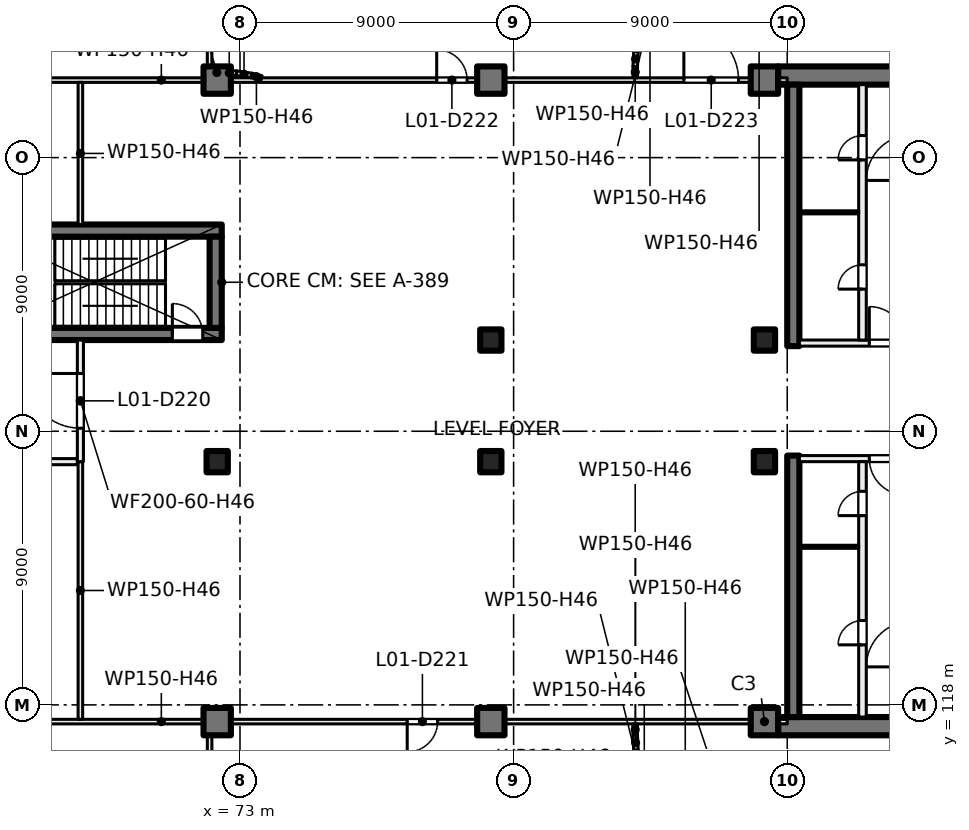
"""IFC4 building model, lengths in metres.
Left out: names, types, materials, properties, quantities, classifications, styles, units other than length and angle.
Written with IfcOpenShell. Run it as: python <this file> out.ifc"""

import sys

from ifc_helpers import new_model, si_unit, direction, frame, frame_2d, origin, origin_2d, place, context, subcontext, project, spatial, rectangle, extrude, element, fill, save


model = new_model("IFC4")
c1 = context("Model", 3, precision=1e-05, world=origin(), true_north=direction((0.0, 1.0)))
c2 = subcontext(c1, "Body", "Model", "MODEL_VIEW")
j1 = project(units=[si_unit("LENGTHUNIT", "METRE"), si_unit("PLANEANGLEUNIT", "RADIAN")], contexts=[c1])
p1 = place(None, origin())
s1 = spatial("IfcSite", under=j1, at=p1, CompositionType="ELEMENT")
p2 = place(p1, origin())
s2 = spatial("IfcBuilding", under=s1, at=p2, CompositionType="ELEMENT")
p3 = place(p2, frame((0.0, 0.0, 7.5)))
s3 = spatial("IfcBuildingStorey", under=s2, at=p3, CompositionType="ELEMENT", Elevation=7.5)
for number, where, z_axis, x_axis in (
    (1, (81.25, 130.0, 0.0), (0.0, 0.0, 1.0), (1.0, 0.0, 0.0)),
    (2, (90.25, 130.0, 0.0), (0.0, 0.0, 1.0), (1.0, 0.0, 0.0)),
    (3, (72.25, 126.0, 0.0), (0.0, 0.0, 1.0), (1.0, 0.0, 0.0)),
    (4, (81.25, 126.0, 0.0), (0.0, 0.0, 1.0), (1.0, 0.0, 0.0)),
    (5, (90.25, 126.0, 0.0), (0.0, 0.0, 1.0), (1.0, 0.0, 0.0)),
):
    element("IfcColumn", number, at=place(p3, frame(where, z_axis=z_axis, x_axis=x_axis)), inside=s3, PredefinedType="COLUMN", context=c2, shape_type="SweptSolid", body=[
        extrude(rectangle(XDim=0.7, YDim=0.7, at=origin_2d()), origin(), (0.0, 0.0, 1.0), 5.0),
    ])
for number, where, z_axis, x_axis in (
    (6, (72.25, 138.55, 0.0), (0.0, 0.0, 1.0), (1.0, 0.0, 0.0)),
    (7, (81.25, 138.55, 0.0), (0.0, 0.0, 1.0), (1.0, 0.0, 0.0)),
    (8, (90.25, 138.55, 0.0), (0.0, 0.0, 1.0), (1.0, 0.0, 0.0)),
    (9, (72.25, 117.45, 0.0), (0.0, 0.0, 1.0), (1.0, 0.0, 0.0)),
    (10, (81.25, 117.45, 0.0), (0.0, 0.0, 1.0), (1.0, 0.0, 0.0)),
    (11, (90.25, 117.45, 0.0), (0.0, 0.0, 1.0), (1.0, 0.0, 0.0)),
):
    element("IfcColumn", number, at=place(p3, frame(where, z_axis=z_axis, x_axis=x_axis)), inside=s3, PredefinedType="COLUMN", context=c2, shape_type="SweptSolid", body=[
        extrude(rectangle(XDim=0.9, YDim=0.9, at=origin_2d()), origin(), (0.0, 0.0, 1.0), 5.0),
    ])
for number, where, z_axis, x_axis in (
    (12, (99.6, 138.7, 0.0), (0.0, 0.0, 1.0), (-1.0, 0.0, 0.0)),
    (13, (99.6, 117.3, 0.0), (0.0, 0.0, 1.0), (-1.0, 0.0, 0.0)),
):
    element("IfcWall", number, at=place(p3, frame(where, z_axis=z_axis, x_axis=x_axis)), inside=s3, PredefinedType="SHEAR", context=c2, shape_type="SweptSolid", body=[
        extrude(rectangle(XDim=8.9, YDim=0.6, at=frame_2d((4.45, 0.0))), origin(), (0.0, 0.0, 1.0), 5.0),
    ])
for number, where, z_axis, x_axis in (
    (14, (91.2, 138.4, 0.0), (0.0, 0.0, 1.0), (0.0, -1.0, 0.0)),
    (15, (91.2, 126.2, 0.0), (0.0, 0.0, 1.0), (0.0, -1.0, 0.0)),
):
    element("IfcWall", number, at=place(p3, frame(where, z_axis=z_axis, x_axis=x_axis)), inside=s3, PredefinedType="SHEAR", context=c2, shape_type="SweptSolid", body=[
        extrude(rectangle(XDim=8.6, YDim=0.4, at=frame_2d((4.3, 0.0))), origin(), (0.0, 0.0, 1.0), 5.0),
    ])
p4 = place(p3, frame((63.6, 130.2, 0.0), z_axis=(0.0, 0.0, 1.0), x_axis=(1.0, 0.0, 0.0)))
e16 = element("IfcWall", 16, at=p4, inside=s3, PredefinedType="SHEAR", context=c2, shape_type="SweptSolid", body=[
    extrude(rectangle(XDim=8.8, YDim=0.4, at=frame_2d((4.4, 0.0))), origin(), (0.0, 0.0, 1.0), 5.0),
])
p5 = place(p4, frame((7.175, 0.0, 0.0)))
e17 = element("IfcOpeningElement", 17, at=p5, cuts=e16, PredefinedType="OPENING", context=c2, shape_type="SweptSolid", body=[
    extrude(rectangle(XDim=1.0, YDim=2.1, at=frame_2d((0.5, 1.05))), frame((0.0, 0.21, 0.0), z_axis=(0.0, -1.0, 0.0), x_axis=(1.0, 0.0, 0.0)), (0.0, 0.0, 1.0), 0.42),
])
p6 = place(p3, frame((64.0, 133.6, 0.0), z_axis=(0.0, 0.0, 1.0), x_axis=(1.0, 0.0, 0.0)))
e18 = element("IfcWall", 18, at=p6, inside=s3, PredefinedType="SHEAR", context=c2, shape_type="SweptSolid", body=[
    extrude(rectangle(XDim=8.4, YDim=0.4, at=frame_2d((4.2, 0.0))), origin(), (0.0, 0.0, 1.0), 5.0),
])
p7 = place(p3, frame((72.2, 130.4, 0.0), z_axis=(0.0, 0.0, 1.0), x_axis=(0.0, 1.0, 0.0)))
e19 = element("IfcWall", 19, at=p7, inside=s3, PredefinedType="SHEAR", context=c2, shape_type="SweptSolid", body=[
    extrude(rectangle(XDim=3.0, YDim=0.4, at=frame_2d((1.5, 0.0))), origin(), (0.0, 0.0, 1.0), 5.0),
])
p8 = place(p3, frame((95.2, 126.1, 0.0), z_axis=(0.0, 0.0, 1.0), x_axis=(-1.0, 0.0, 0.0)))
e20 = element("IfcWall", 20, at=p8, inside=s3, PredefinedType="PARTITIONING", context=c2, shape_type="SweptSolid", body=[
    extrude(rectangle(XDim=3.8, YDim=0.2, at=frame_2d((1.9, 0.0))), origin(), (0.0, 0.0, 1.0), 4.6),
])
p9 = place(p8, frame((0.3, 0.0, 0.0)))
e21 = element("IfcOpeningElement", 21, at=p9, cuts=e20, PredefinedType="OPENING", context=c2, shape_type="SweptSolid", body=[
    extrude(rectangle(XDim=1.2, YDim=2.1, at=frame_2d((0.6, 1.05))), frame((0.0, 0.11, 0.0), z_axis=(0.0, -1.0, 0.0), x_axis=(1.0, 0.0, 0.0)), (0.0, 0.0, 1.0), 0.22),
])
p10 = place(p3, frame((93.475, 117.6, 0.0), z_axis=(0.0, 0.0, 1.0), x_axis=(0.0, 1.0, 0.0)))
e22 = element("IfcWall", 22, at=p10, inside=s3, PredefinedType="PARTITIONING", context=c2, shape_type="SweptSolid", body=[
    extrude(rectangle(XDim=8.4, YDim=0.25, at=frame_2d((4.2, 0.0))), origin(), (0.0, 0.0, 1.0), 4.6),
])
p11 = place(p10, frame((6.625, 0.0, 0.0)))
e23 = element("IfcOpeningElement", 23, at=p11, cuts=e22, PredefinedType="OPENING", context=c2, shape_type="SweptSolid", body=[
    extrude(rectangle(XDim=0.8, YDim=2.1, at=frame_2d((0.4, 1.05))), frame((0.0, 0.135, 0.0), z_axis=(0.0, -1.0, 0.0), x_axis=(1.0, 0.0, 0.0)), (0.0, 0.0, 1.0), 0.27),
])
p12 = place(p10, frame((2.375, 0.0, 0.0)))
e24 = element("IfcOpeningElement", 24, at=p12, cuts=e22, PredefinedType="OPENING", context=c2, shape_type="SweptSolid", body=[
    extrude(rectangle(XDim=0.8, YDim=2.1, at=frame_2d((0.4, 1.05))), frame((0.0, 0.135, 0.0), z_axis=(0.0, -1.0, 0.0), x_axis=(1.0, 0.0, 0.0)), (0.0, 0.0, 1.0), 0.27),
])
p13 = place(p3, frame((93.35, 123.2, 0.0), z_axis=(0.0, 0.0, 1.0), x_axis=(-1.0, 0.0, 0.0)))
e25 = element("IfcWall", 25, at=p13, inside=s3, PredefinedType="PARTITIONING", context=c2, shape_type="SweptSolid", body=[
    extrude(rectangle(XDim=1.95, YDim=0.1, at=frame_2d((0.975, 0.0))), origin(), (0.0, 0.0, 1.0), 4.6),
])
p14 = place(p3, frame((91.4, 129.9, 0.0), z_axis=(0.0, 0.0, 1.0), x_axis=(1.0, 0.0, 0.0)))
e26 = element("IfcWall", 26, at=p14, inside=s3, PredefinedType="PARTITIONING", context=c2, shape_type="SweptSolid", body=[
    extrude(rectangle(XDim=3.8, YDim=0.2, at=frame_2d((1.9, 0.0))), origin(), (0.0, 0.0, 1.0), 4.6),
])
p15 = place(p14, frame((2.3, 0.0, 0.0)))
e27 = element("IfcOpeningElement", 27, at=p15, cuts=e26, PredefinedType="OPENING", context=c2, shape_type="SweptSolid", body=[
    extrude(rectangle(XDim=1.2, YDim=2.1, at=frame_2d((0.6, 1.05))), frame((0.0, 0.11, 0.0), z_axis=(0.0, -1.0, 0.0), x_axis=(1.0, 0.0, 0.0)), (0.0, 0.0, 1.0), 0.22),
])
p16 = place(p3, frame((93.475, 130.0, 0.0), z_axis=(0.0, 0.0, 1.0), x_axis=(0.0, 1.0, 0.0)))
e28 = element("IfcWall", 28, at=p16, inside=s3, PredefinedType="PARTITIONING", context=c2, shape_type="SweptSolid", body=[
    extrude(rectangle(XDim=8.4, YDim=0.25, at=frame_2d((4.2, 0.0))), origin(), (0.0, 0.0, 1.0), 4.6),
])
p17 = place(p16, frame((1.675, 0.0, 0.0)))
e29 = element("IfcOpeningElement", 29, at=p17, cuts=e28, PredefinedType="OPENING", context=c2, shape_type="SweptSolid", body=[
    extrude(rectangle(XDim=0.8, YDim=2.1, at=frame_2d((0.4, 1.05))), frame((0.0, 0.135, 0.0), z_axis=(0.0, -1.0, 0.0), x_axis=(1.0, 0.0, 0.0)), (0.0, 0.0, 1.0), 0.27),
])
p18 = place(p16, frame((5.925, 0.0, 0.0)))
e30 = element("IfcOpeningElement", 30, at=p18, cuts=e28, PredefinedType="OPENING", context=c2, shape_type="SweptSolid", body=[
    extrude(rectangle(XDim=0.8, YDim=2.1, at=frame_2d((0.4, 1.05))), frame((0.0, 0.135, 0.0), z_axis=(0.0, -1.0, 0.0), x_axis=(1.0, 0.0, 0.0)), (0.0, 0.0, 1.0), 0.27),
])
p19 = place(p3, frame((91.4, 134.2, 0.0), z_axis=(0.0, 0.0, 1.0), x_axis=(1.0, 0.0, 0.0)))
e31 = element("IfcWall", 31, at=p19, inside=s3, PredefinedType="PARTITIONING", context=c2, shape_type="SweptSolid", body=[
    extrude(rectangle(XDim=1.95, YDim=0.1, at=frame_2d((0.975, 0.0))), origin(), (0.0, 0.0, 1.0), 4.6),
])
p20 = place(p3, frame((91.0, 117.45, 0.0), z_axis=(0.0, 0.0, 1.0), x_axis=(-1.0, 0.0, 0.0)))
e32 = element("IfcWall", 32, at=p20, inside=s3, PredefinedType="PARTITIONING", context=c2, shape_type="SweptSolid", body=[
    extrude(rectangle(XDim=41.175, YDim=0.15, at=frame_2d((20.587, 0.0))), origin(), (0.0, 0.0, 1.0), 4.6),
])
p21 = place(p20, frame((11.5, 0.0, 0.0)))
e33 = element("IfcOpeningElement", 33, at=p21, cuts=e32, PredefinedType="OPENING", context=c2, shape_type="SweptSolid", body=[
    extrude(rectangle(XDim=1.0, YDim=2.1, at=frame_2d((0.5, 1.05))), frame((0.0, 0.085, 0.0), z_axis=(0.0, -1.0, 0.0), x_axis=(1.0, 0.0, 0.0)), (0.0, 0.0, 1.0), 0.17),
])
p22 = place(p3, frame((67.65, 126.0, 0.0), z_axis=(0.0, 0.0, 1.0), x_axis=(-1.0, 0.0, 0.0)))
e34 = element("IfcWall", 34, at=p22, inside=s3, PredefinedType="PARTITIONING", context=c2, shape_type="SweptSolid", body=[
    extrude(rectangle(XDim=17.8, YDim=0.2, at=frame_2d((8.9, 0.0))), origin(), (0.0, 0.0, 1.0), 4.6),
])
p23 = place(p22, frame((15.148, 0.0, 0.0)))
e35 = element("IfcOpeningElement", 35, at=p23, cuts=e34, PredefinedType="OPENING", context=c2, shape_type="SweptSolid", body=[
    extrude(rectangle(XDim=1.0, YDim=2.1, at=frame_2d((0.5, 1.05))), frame((0.0, 0.11, 0.0), z_axis=(0.0, -1.0, 0.0), x_axis=(1.0, 0.0, 0.0)), (0.0, 0.0, 1.0), 0.22),
])
p24 = place(p22, frame((10.65, 0.0, 0.0)))
e36 = element("IfcOpeningElement", 36, at=p24, cuts=e34, PredefinedType="OPENING", context=c2, shape_type="SweptSolid", body=[
    extrude(rectangle(XDim=1.0, YDim=2.1, at=frame_2d((0.5, 1.05))), frame((0.0, 0.11, 0.0), z_axis=(0.0, -1.0, 0.0), x_axis=(1.0, 0.0, 0.0)), (0.0, 0.0, 1.0), 0.22),
])
p25 = place(p22, frame((3.002, 0.0, 0.0)))
e37 = element("IfcOpeningElement", 37, at=p25, cuts=e34, PredefinedType="OPENING", context=c2, shape_type="SweptSolid", body=[
    extrude(rectangle(XDim=1.0, YDim=2.1, at=frame_2d((0.5, 1.05))), frame((0.0, 0.11, 0.0), z_axis=(0.0, -1.0, 0.0), x_axis=(1.0, 0.0, 0.0)), (0.0, 0.0, 1.0), 0.22),
])
p26 = place(p3, frame((49.825, 138.55, 0.0), z_axis=(0.0, 0.0, 1.0), x_axis=(1.0, 0.0, 0.0)))
e38 = element("IfcWall", 38, at=p26, inside=s3, PredefinedType="PARTITIONING", context=c2, shape_type="SweptSolid", body=[
    extrude(rectangle(XDim=41.175, YDim=0.15, at=frame_2d((20.587, 0.0))), origin(), (0.0, 0.0, 1.0), 4.6),
])
p27 = place(p26, frame((29.645, 0.0, 0.0)))
e39 = element("IfcOpeningElement", 39, at=p27, cuts=e38, PredefinedType="OPENING", context=c2, shape_type="SweptSolid", body=[
    extrude(rectangle(XDim=1.0, YDim=2.1, at=frame_2d((0.5, 1.05))), frame((0.0, 0.085, 0.0), z_axis=(0.0, -1.0, 0.0), x_axis=(1.0, 0.0, 0.0)), (0.0, 0.0, 1.0), 0.17),
])
p28 = place(p26, frame((37.775, 0.0, 0.0)))
e40 = element("IfcOpeningElement", 40, at=p28, cuts=e38, PredefinedType="OPENING", context=c2, shape_type="SweptSolid", body=[
    extrude(rectangle(XDim=1.8, YDim=2.1, at=frame_2d((0.9, 1.05))), frame((0.0, 0.085, 0.0), z_axis=(0.0, -1.0, 0.0), x_axis=(1.0, 0.0, 0.0)), (0.0, 0.0, 1.0), 0.17),
])
p29 = place(p3, frame((67.75, 117.525, 0.0), z_axis=(0.0, 0.0, 1.0), x_axis=(0.0, 1.0, 0.0)))
e41 = element("IfcWall", 41, at=p29, inside=s3, PredefinedType="PARTITIONING", context=c2, shape_type="SweptSolid", body=[
    extrude(rectangle(XDim=8.475, YDim=0.15, at=frame_2d((4.238, 0.0))), origin(), (0.0, 0.0, 1.0), 4.6),
])
p30 = place(p3, frame((67.75, 130.0, 0.0), z_axis=(0.0, 0.0, 1.0), x_axis=(0.0, -1.0, 0.0)))
e42 = element("IfcWall", 42, at=p30, inside=s3, PredefinedType="PARTITIONING", context=c2, shape_type="SweptSolid", body=[
    extrude(rectangle(XDim=4.0, YDim=0.2, at=frame_2d((2.0, 0.0))), origin(), (0.0, 0.0, 1.0), 4.6),
])
p31 = place(p30, frame((1.1, 0.0, 0.0)))
e43 = element("IfcOpeningElement", 43, at=p31, cuts=e42, PredefinedType="OPENING", context=c2, shape_type="SweptSolid", body=[
    extrude(rectangle(XDim=1.8, YDim=2.1, at=frame_2d((0.9, 1.05))), frame((0.0, 0.11, 0.0), z_axis=(0.0, -1.0, 0.0), x_axis=(1.0, 0.0, 0.0)), (0.0, 0.0, 1.0), 0.22),
])
p32 = place(p3, frame((67.75, 133.8, 0.0), z_axis=(0.0, 0.0, 1.0), x_axis=(0.0, 1.0, 0.0)))
e44 = element("IfcWall", 44, at=p32, inside=s3, PredefinedType="PARTITIONING", context=c2, shape_type="SweptSolid", body=[
    extrude(rectangle(XDim=4.675, YDim=0.15, at=frame_2d((2.337, 0.0))), origin(), (0.0, 0.0, 1.0), 4.6),
])
p33 = place(p3, frame((72.0, 109.0, 0.0), z_axis=(0.0, 0.0, 1.0), x_axis=(0.0, 1.0, 0.0)))
e45 = element("IfcWall", 45, at=p33, inside=s3, PredefinedType="PARTITIONING", context=c2, shape_type="SweptSolid", body=[
    extrude(rectangle(XDim=8.375, YDim=0.15, at=frame_2d((4.188, 0.0))), origin(), (0.0, 0.0, 1.0), 3.6),
])
p34 = place(p3, frame((72.0, 138.725, 0.0), z_axis=(0.0, 0.0, 1.0), x_axis=(0.0, 1.0, 0.0)))
e46 = element("IfcWall", 46, at=p34, inside=s3, PredefinedType="PARTITIONING", context=c2, shape_type="SweptSolid", body=[
    extrude(rectangle(XDim=5.35, YDim=0.15, at=frame_2d((2.675, 0.0))), origin(), (0.0, 0.0, 1.0), 4.6),
])
p35 = place(p3, frame((72.075, 138.8, 0.0), z_axis=(0.0, 0.0, 1.0), x_axis=(1.0, 0.0, 0.0)))
e47 = element("IfcWall", 47, at=p35, inside=s3, PredefinedType="PARTITIONING", context=c2, shape_type="SweptSolid", body=[
    extrude(rectangle(XDim=0.327, YDim=0.15, at=frame_2d((0.164, 0.0))), origin(), (0.0, 0.0, 1.0), 4.6),
])
p36 = place(p3, frame((72.398, 138.8, 0.0), z_axis=(0.0, 0.0, 1.0), x_axis=(0.998815266503, -0.048662751665, 0.0)))
e48 = element("IfcWall", 48, at=p36, inside=s3, PredefinedType="PARTITIONING", context=c2, shape_type="SweptSolid", body=[
    extrude(rectangle(XDim=0.497, YDim=0.15, at=frame_2d((0.248, 0.0))), origin(), (0.0, 0.0, 1.0), 4.6),
])
p37 = place(p3, frame((72.886, 138.777, 0.0), z_axis=(0.0, 0.0, 1.0), x_axis=(0.988853572557, -0.148891275908, 0.0)))
e49 = element("IfcWall", 49, at=p37, inside=s3, PredefinedType="PARTITIONING", context=c2, shape_type="SweptSolid", body=[
    extrude(rectangle(XDim=0.499, YDim=0.15, at=frame_2d((0.249, 0.0))), origin(), (0.0, 0.0, 1.0), 4.6),
])
p38 = place(p3, frame((73.371, 138.705, 0.0), z_axis=(0.0, 0.0, 1.0), x_axis=(0.969811847647, -0.243854424119, 0.0)))
e50 = element("IfcWall", 50, at=p38, inside=s3, PredefinedType="PARTITIONING", context=c2, shape_type="SweptSolid", body=[
    extrude(rectangle(XDim=0.348, YDim=0.15, at=frame_2d((0.174, 0.0))), origin(), (0.0, 0.0, 1.0), 4.6),
])
p39 = place(p3, frame((86.0, 116.998, 0.0), z_axis=(0.0, 0.0, 1.0), x_axis=(0.0, 1.0, 0.0)))
e51 = element("IfcWall", 51, at=p39, inside=s3, PredefinedType="PARTITIONING", context=c2, shape_type="SweptSolid", body=[
    extrude(rectangle(XDim=0.377, YDim=0.15, at=frame_2d((0.188, 0.0))), origin(), (0.0, 0.0, 1.0), 4.6),
])
p40 = place(p3, frame((86.0, 117.002, 0.0), z_axis=(0.0, 0.0, 1.0), x_axis=(0.048196018647, -0.998837896651, 0.0)))
e52 = element("IfcWall", 52, at=p40, inside=s3, PredefinedType="PARTITIONING", context=c2, shape_type="SweptSolid", body=[
    extrude(rectangle(XDim=0.496, YDim=0.15, at=frame_2d((0.248, 0.0))), origin(), (0.0, 0.0, 1.0), 4.6),
])
p41 = place(p3, frame((86.0, 138.625, 0.0), z_axis=(0.0, 0.0, 1.0), x_axis=(0.0, 1.0, 0.0)))
e53 = element("IfcWall", 53, at=p41, inside=s3, PredefinedType="PARTITIONING", context=c2, shape_type="SweptSolid", body=[
    extrude(rectangle(XDim=0.377, YDim=0.15, at=frame_2d((0.188, 0.0))), origin(), (0.0, 0.0, 1.0), 4.6),
])
p42 = place(p3, frame((86.0, 138.998, 0.0), z_axis=(0.0, 0.0, 1.0), x_axis=(0.048196018647, 0.998837896651, 0.0)))
e54 = element("IfcWall", 54, at=p42, inside=s3, PredefinedType="PARTITIONING", context=c2, shape_type="SweptSolid", body=[
    extrude(rectangle(XDim=0.496, YDim=0.15, at=frame_2d((0.248, 0.0))), origin(), (0.0, 0.0, 1.0), 4.6),
])
p43 = place(p3, frame((86.023, 139.486, 0.0), z_axis=(0.0, 0.0, 1.0), x_axis=(0.148412307247, 0.988925572052, 0.0)))
e55 = element("IfcWall", 55, at=p43, inside=s3, PredefinedType="PARTITIONING", context=c2, shape_type="SweptSolid", body=[
    extrude(rectangle(XDim=0.499, YDim=0.15, at=frame_2d((0.249, 0.0))), origin(), (0.0, 0.0, 1.0), 4.6),
])
p44 = place(p9, origin())
e56 = element("IfcDoor", 56, at=p44, inside=s3, OperationType="DOUBLE_DOOR_SINGLE_SWING", PredefinedType="DOOR", context=c2, shape_type="SweptSolid", body=[
    extrude(rectangle(XDim=1.2, YDim=2.1, at=frame_2d((0.6, 1.05))), frame((0.0, 0.025, 0.0), z_axis=(0.0, -1.0, 0.0), x_axis=(1.0, 0.0, 0.0)), (0.0, 0.0, 1.0), 0.05),
])
fill(e21, e56)
p45 = place(p11, origin())
e57 = element("IfcDoor", 57, at=p45, inside=s3, OperationType="SINGLE_SWING_LEFT", PredefinedType="DOOR", context=c2, shape_type="SweptSolid", body=[
    extrude(rectangle(XDim=0.8, YDim=2.1, at=frame_2d((0.4, 1.05))), frame((0.0, 0.025, 0.0), z_axis=(0.0, -1.0, 0.0), x_axis=(1.0, 0.0, 0.0)), (0.0, 0.0, 1.0), 0.05),
])
fill(e23, e57)
p46 = place(p12, origin())
e58 = element("IfcDoor", 58, at=p46, inside=s3, OperationType="SINGLE_SWING_RIGHT", PredefinedType="DOOR", context=c2, shape_type="SweptSolid", body=[
    extrude(rectangle(XDim=0.8, YDim=2.1, at=frame_2d((0.4, 1.05))), frame((0.0, 0.025, 0.0), z_axis=(0.0, -1.0, 0.0), x_axis=(1.0, 0.0, 0.0)), (0.0, 0.0, 1.0), 0.05),
])
fill(e24, e58)
p47 = place(p15, origin())
e59 = element("IfcDoor", 59, at=p47, inside=s3, OperationType="DOUBLE_DOOR_SINGLE_SWING", PredefinedType="DOOR", context=c2, shape_type="SweptSolid", body=[
    extrude(rectangle(XDim=1.2, YDim=2.1, at=frame_2d((0.6, 1.05))), frame((0.0, 0.025, 0.0), z_axis=(0.0, -1.0, 0.0), x_axis=(1.0, 0.0, 0.0)), (0.0, 0.0, 1.0), 0.05),
])
fill(e27, e59)
p48 = place(p17, origin())
e60 = element("IfcDoor", 60, at=p48, inside=s3, OperationType="SINGLE_SWING_RIGHT", PredefinedType="DOOR", context=c2, shape_type="SweptSolid", body=[
    extrude(rectangle(XDim=0.8, YDim=2.1, at=frame_2d((0.4, 1.05))), frame((0.0, 0.025, 0.0), z_axis=(0.0, -1.0, 0.0), x_axis=(1.0, 0.0, 0.0)), (0.0, 0.0, 1.0), 0.05),
])
fill(e29, e60)
p49 = place(p18, origin())
e61 = element("IfcDoor", 61, at=p49, inside=s3, OperationType="SINGLE_SWING_LEFT", PredefinedType="DOOR", context=c2, shape_type="SweptSolid", body=[
    extrude(rectangle(XDim=0.8, YDim=2.1, at=frame_2d((0.4, 1.05))), frame((0.0, 0.025, 0.0), z_axis=(0.0, -1.0, 0.0), x_axis=(1.0, 0.0, 0.0)), (0.0, 0.0, 1.0), 0.05),
])
fill(e30, e61)
p50 = place(p5, origin())
e62 = element("IfcDoor", 62, at=p50, inside=s3, OperationType="SINGLE_SWING_LEFT", PredefinedType="DOOR", context=c2, shape_type="SweptSolid", body=[
    extrude(rectangle(XDim=1.0, YDim=2.1, at=frame_2d((0.5, 1.05))), frame((0.0, 0.025, 0.0), z_axis=(0.0, -1.0, 0.0), x_axis=(1.0, 0.0, 0.0)), (0.0, 0.0, 1.0), 0.05),
])
fill(e17, e62)
p51 = place(p31, origin())
e63 = element("IfcDoor", 63, at=p51, inside=s3, OperationType="DOUBLE_DOOR_SINGLE_SWING", PredefinedType="DOOR", context=c2, shape_type="SweptSolid", body=[
    extrude(rectangle(XDim=1.8, YDim=2.1, at=frame_2d((0.9, 1.05))), frame((0.0, 0.025, 0.0), z_axis=(0.0, -1.0, 0.0), x_axis=(1.0, 0.0, 0.0)), (0.0, 0.0, 1.0), 0.05),
])
fill(e43, e63)
p52 = place(p21, origin())
e64 = element("IfcDoor", 64, at=p52, inside=s3, OperationType="SINGLE_SWING_RIGHT", PredefinedType="DOOR", context=c2, shape_type="SweptSolid", body=[
    extrude(rectangle(XDim=1.0, YDim=2.1, at=frame_2d((0.5, 1.05))), frame((0.0, 0.025, 0.0), z_axis=(0.0, -1.0, 0.0), x_axis=(1.0, 0.0, 0.0)), (0.0, 0.0, 1.0), 0.05),
])
fill(e33, e64)
p53 = place(p27, origin())
e65 = element("IfcDoor", 65, at=p53, inside=s3, OperationType="SINGLE_SWING_LEFT", PredefinedType="DOOR", context=c2, shape_type="SweptSolid", body=[
    extrude(rectangle(XDim=1.0, YDim=2.1, at=frame_2d((0.5, 1.05))), frame((0.0, 0.025, 0.0), z_axis=(0.0, -1.0, 0.0), x_axis=(1.0, 0.0, 0.0)), (0.0, 0.0, 1.0), 0.05),
])
fill(e39, e65)
p54 = place(p28, origin())
e66 = element("IfcDoor", 66, at=p54, inside=s3, OperationType="DOUBLE_DOOR_SINGLE_SWING", PredefinedType="DOOR", context=c2, shape_type="SweptSolid", body=[
    extrude(rectangle(XDim=1.8, YDim=2.1, at=frame_2d((0.9, 1.05))), frame((0.0, 0.025, 0.0), z_axis=(0.0, -1.0, 0.0), x_axis=(1.0, 0.0, 0.0)), (0.0, 0.0, 1.0), 0.05),
])
fill(e40, e66)
save(model, sys.argv[1])
